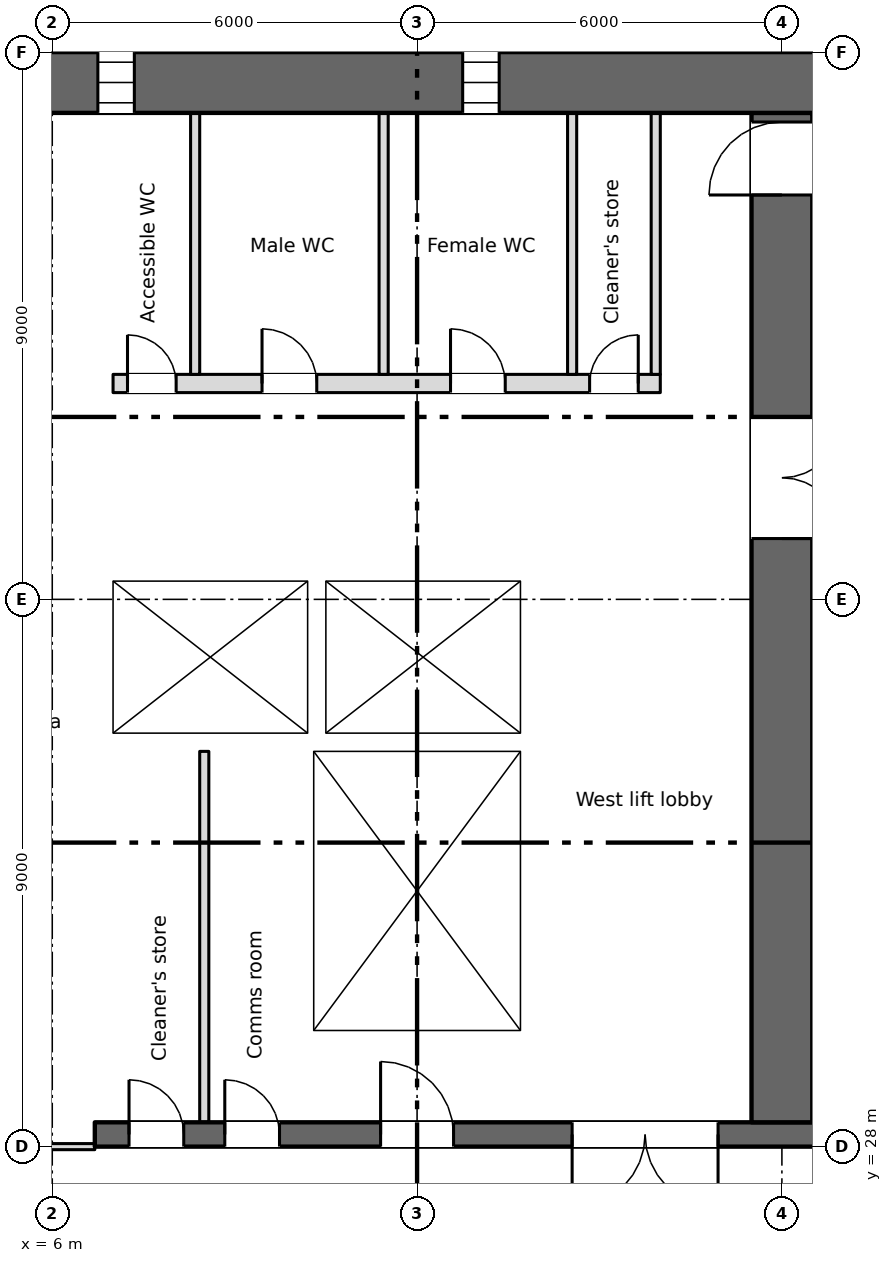
"""IFC4 building model, lengths in metres.
Left out: names, types, materials, properties, quantities, classifications, styles, units other than length and angle.
Written with IfcOpenShell. Run it as: python <this file> out.ifc"""

import sys

from ifc_helpers import new_model, si_unit, direction, frame, frame_2d, origin, place, context, subcontext, project, spatial, rectangle, extrude, element, fill, save


model = new_model("IFC4")
c1 = context("Model", 3, precision=1e-05, world=origin(), true_north=direction((0.0, 1.0)))
c2 = subcontext(c1, "Body", "Model", "MODEL_VIEW")
j1 = project(units=[si_unit("LENGTHUNIT", "METRE"), si_unit("PLANEANGLEUNIT", "RADIAN")], contexts=[c1])
p1 = place(None, origin())
s1 = spatial("IfcSite", under=j1, at=p1, CompositionType="ELEMENT")
p2 = place(p1, origin())
s2 = spatial("IfcBuilding", under=s1, at=p2, CompositionType="ELEMENT")
p3 = place(p2, frame((0.0, 0.0, 26.25)))
s3 = spatial("IfcBuildingStorey", under=s2, at=p3, CompositionType="ELEMENT", Elevation=26.25)
p4 = place(p3, frame((5.55, 45.5, 0.0), z_axis=(0.0, 0.0, 1.0), x_axis=(1.0, 0.0, 0.0)))
e1 = element("IfcWall", 1, at=p4, inside=s3, PredefinedType="SHEAR", context=c2, shape_type="SweptSolid", body=[
    extrude(rectangle(XDim=66.9, YDim=1.0, at=frame_2d((33.45, 0.0))), origin(), (0.0, 0.0, 1.0), 3.35),
])
p5 = place(p4, frame((1.2, 0.0, 0.6)))
e2 = element("IfcOpeningElement", 2, at=p5, cuts=e1, PredefinedType="OPENING", context=c2, shape_type="SweptSolid", body=[
    extrude(rectangle(XDim=0.6, YDim=2.4, at=frame_2d((0.3, 1.2))), frame((0.0, 0.51, 0.0), z_axis=(0.0, -1.0, 0.0), x_axis=(1.0, 0.0, 0.0)), (0.0, 0.0, 1.0), 1.02),
])
p6 = place(p4, frame((7.2, 0.0, 0.6)))
e3 = element("IfcOpeningElement", 3, at=p6, cuts=e1, PredefinedType="OPENING", context=c2, shape_type="SweptSolid", body=[
    extrude(rectangle(XDim=0.6, YDim=2.4, at=frame_2d((0.3, 1.2))), frame((0.0, 0.51, 0.0), z_axis=(0.0, -1.0, 0.0), x_axis=(1.0, 0.0, 0.0)), (0.0, 0.0, 1.0), 1.02),
])
p7 = place(p3, frame((6.7, 28.2, 0.0), z_axis=(0.0, 0.0, 1.0), x_axis=(1.0, 0.0, 0.0)))
e4 = element("IfcWall", 4, at=p7, inside=s3, PredefinedType="SHEAR", context=c2, shape_type="SweptSolid", body=[
    extrude(rectangle(XDim=57.8, YDim=0.4, at=frame_2d((28.9, 0.0))), origin(), (0.0, 0.0, 1.0), 3.35),
])
p8 = place(p7, frame((12.562, 0.0, 0.0)))
e5 = element("IfcOpeningElement", 5, at=p8, cuts=e4, PredefinedType="OPENING", context=c2, shape_type="SweptSolid", body=[
    extrude(rectangle(XDim=0.9, YDim=2.1, at=frame_2d((0.45, 1.05))), frame((0.0, 0.21, 0.0), z_axis=(0.0, -1.0, 0.0), x_axis=(1.0, 0.0, 0.0)), (0.0, 0.0, 1.0), 0.42),
])
p9 = place(p7, frame((15.137, 0.0, 0.0)))
e6 = element("IfcOpeningElement", 6, at=p9, cuts=e4, PredefinedType="OPENING", context=c2, shape_type="SweptSolid", body=[
    extrude(rectangle(XDim=0.9, YDim=2.1, at=frame_2d((0.45, 1.05))), frame((0.0, 0.21, 0.0), z_axis=(0.0, -1.0, 0.0), x_axis=(1.0, 0.0, 0.0)), (0.0, 0.0, 1.0), 0.42),
])
p10 = place(p7, frame((49.85, 0.0, 0.0)))
e7 = element("IfcOpeningElement", 7, at=p10, cuts=e4, PredefinedType="OPENING", context=c2, shape_type="SweptSolid", body=[
    extrude(rectangle(XDim=0.9, YDim=2.1, at=frame_2d((0.45, 1.05))), frame((0.0, 0.21, 0.0), z_axis=(0.0, -1.0, 0.0), x_axis=(1.0, 0.0, 0.0)), (0.0, 0.0, 1.0), 0.42),
])
p11 = place(p7, frame((0.562, 0.0, 0.0)))
e8 = element("IfcOpeningElement", 8, at=p11, cuts=e4, PredefinedType="OPENING", context=c2, shape_type="SweptSolid", body=[
    extrude(rectangle(XDim=0.9, YDim=2.1, at=frame_2d((0.45, 1.05))), frame((0.0, 0.21, 0.0), z_axis=(0.0, -1.0, 0.0), x_axis=(1.0, 0.0, 0.0)), (0.0, 0.0, 1.0), 0.42),
])
p12 = place(p7, frame((2.137, 0.0, 0.0)))
e9 = element("IfcOpeningElement", 9, at=p12, cuts=e4, PredefinedType="OPENING", context=c2, shape_type="SweptSolid", body=[
    extrude(rectangle(XDim=0.9, YDim=2.1, at=frame_2d((0.45, 1.05))), frame((0.0, 0.21, 0.0), z_axis=(0.0, -1.0, 0.0), x_axis=(1.0, 0.0, 0.0)), (0.0, 0.0, 1.0), 0.42),
])
p13 = place(p7, frame((4.7, 0.0, 0.0)))
e10 = element("IfcOpeningElement", 10, at=p13, cuts=e4, PredefinedType="OPENING", context=c2, shape_type="SweptSolid", body=[
    extrude(rectangle(XDim=1.2, YDim=2.1, at=frame_2d((0.6, 1.05))), frame((0.0, 0.21, 0.0), z_axis=(0.0, -1.0, 0.0), x_axis=(1.0, 0.0, 0.0)), (0.0, 0.0, 1.0), 0.42),
])
p14 = place(p7, frame((31.7, 0.0, 0.0)))
e11 = element("IfcOpeningElement", 11, at=p14, cuts=e4, PredefinedType="OPENING", context=c2, shape_type="SweptSolid", body=[
    extrude(rectangle(XDim=1.2, YDim=2.1, at=frame_2d((0.6, 1.05))), frame((0.0, 0.21, 0.0), z_axis=(0.0, -1.0, 0.0), x_axis=(1.0, 0.0, 0.0)), (0.0, 0.0, 1.0), 0.42),
])
p15 = place(p7, frame((55.2, 0.0, 0.0)))
e12 = element("IfcOpeningElement", 12, at=p15, cuts=e4, PredefinedType="OPENING", context=c2, shape_type="SweptSolid", body=[
    extrude(rectangle(XDim=1.2, YDim=2.1, at=frame_2d((0.6, 1.05))), frame((0.0, 0.21, 0.0), z_axis=(0.0, -1.0, 0.0), x_axis=(1.0, 0.0, 0.0)), (0.0, 0.0, 1.0), 0.42),
])
p16 = place(p7, frame((21.7, 0.0, 0.0)))
e13 = element("IfcOpeningElement", 13, at=p16, cuts=e4, PredefinedType="OPENING", context=c2, shape_type="SweptSolid", body=[
    extrude(rectangle(XDim=1.2, YDim=2.1, at=frame_2d((0.6, 1.05))), frame((0.0, 0.21, 0.0), z_axis=(0.0, -1.0, 0.0), x_axis=(1.0, 0.0, 0.0)), (0.0, 0.0, 1.0), 0.42),
])
p17 = place(p7, frame((41.7, 0.0, 0.0)))
e14 = element("IfcOpeningElement", 14, at=p17, cuts=e4, PredefinedType="OPENING", context=c2, shape_type="SweptSolid", body=[
    extrude(rectangle(XDim=1.2, YDim=2.1, at=frame_2d((0.6, 1.05))), frame((0.0, 0.21, 0.0), z_axis=(0.0, -1.0, 0.0), x_axis=(1.0, 0.0, 0.0)), (0.0, 0.0, 1.0), 0.42),
])
p18 = place(p7, frame((24.85, 0.0, 0.0)))
e15 = element("IfcOpeningElement", 15, at=p18, cuts=e4, PredefinedType="OPENING", context=c2, shape_type="SweptSolid", body=[
    extrude(rectangle(XDim=2.4, YDim=2.1, at=frame_2d((1.2, 1.05))), frame((0.0, 0.21, 0.0), z_axis=(0.0, -1.0, 0.0), x_axis=(1.0, 0.0, 0.0)), (0.0, 0.0, 1.0), 0.42),
])
p19 = place(p7, frame((37.35, 0.0, 0.0)))
e16 = element("IfcOpeningElement", 16, at=p19, cuts=e4, PredefinedType="OPENING", context=c2, shape_type="SweptSolid", body=[
    extrude(rectangle(XDim=2.4, YDim=2.1, at=frame_2d((1.2, 1.05))), frame((0.0, 0.21, 0.0), z_axis=(0.0, -1.0, 0.0), x_axis=(1.0, 0.0, 0.0)), (0.0, 0.0, 1.0), 0.42),
])
p20 = place(p7, frame((7.85, 0.0, 0.0)))
e17 = element("IfcOpeningElement", 17, at=p20, cuts=e4, PredefinedType="OPENING", context=c2, shape_type="SweptSolid", body=[
    extrude(rectangle(XDim=2.4, YDim=2.1, at=frame_2d((1.2, 1.05))), frame((0.0, 0.21, 0.0), z_axis=(0.0, -1.0, 0.0), x_axis=(1.0, 0.0, 0.0)), (0.0, 0.0, 1.0), 0.42),
])
p21 = place(p7, frame((28.85, 0.0, 0.0)))
e18 = element("IfcOpeningElement", 18, at=p21, cuts=e4, PredefinedType="OPENING", context=c2, shape_type="SweptSolid", body=[
    extrude(rectangle(XDim=0.9, YDim=2.1, at=frame_2d((0.45, 1.05))), frame((0.0, 0.21, 0.0), z_axis=(0.0, -1.0, 0.0), x_axis=(1.0, 0.0, 0.0)), (0.0, 0.0, 1.0), 0.42),
])
p22 = place(p7, frame((34.85, 0.0, 0.0)))
e19 = element("IfcOpeningElement", 19, at=p22, cuts=e4, PredefinedType="OPENING", context=c2, shape_type="SweptSolid", body=[
    extrude(rectangle(XDim=0.9, YDim=2.1, at=frame_2d((0.45, 1.05))), frame((0.0, 0.21, 0.0), z_axis=(0.0, -1.0, 0.0), x_axis=(1.0, 0.0, 0.0)), (0.0, 0.0, 1.0), 0.42),
])
p23 = place(p3, frame((6.85, 28.4, 0.0), z_axis=(0.0, 0.0, 1.0), x_axis=(0.0, 1.0, 0.0)))
e20 = element("IfcWall", 20, at=p23, inside=s3, PredefinedType="SHEAR", context=c2, shape_type="SweptSolid", body=[
    extrude(rectangle(XDim=16.6, YDim=0.3, at=frame_2d((8.3, 0.0))), origin(), (0.0, 0.0, 1.0), 3.35),
])
p24 = place(p3, frame((18.0, 28.4, 0.0), z_axis=(0.0, 0.0, 1.0), x_axis=(0.0, 1.0, 0.0)))
e21 = element("IfcWall", 21, at=p24, inside=s3, PredefinedType="SHEAR", context=c2, shape_type="SweptSolid", body=[
    extrude(rectangle(XDim=16.6, YDim=1.0, at=frame_2d((8.3, 0.0))), origin(), (0.0, 0.0, 1.0), 3.35),
])
p25 = place(p24, frame((9.6, 0.0, 0.0)))
e22 = element("IfcOpeningElement", 22, at=p25, cuts=e21, PredefinedType="OPENING", context=c2, shape_type="SweptSolid", body=[
    extrude(rectangle(XDim=2.0, YDim=2.1, at=frame_2d((1.0, 1.05))), frame((0.0, 0.51, 0.0), z_axis=(0.0, -1.0, 0.0), x_axis=(1.0, 0.0, 0.0)), (0.0, 0.0, 1.0), 1.02),
])
p26 = place(p24, frame((15.25, 0.0, 0.0)))
e23 = element("IfcOpeningElement", 23, at=p26, cuts=e21, PredefinedType="OPENING", context=c2, shape_type="SweptSolid", body=[
    extrude(rectangle(XDim=1.2, YDim=2.1, at=frame_2d((0.6, 1.05))), frame((0.0, 0.51, 0.0), z_axis=(0.0, -1.0, 0.0), x_axis=(1.0, 0.0, 0.0)), (0.0, 0.0, 1.0), 1.02),
])
for number, where, z_axis, x_axis in (
    (24, (10.15, 28.4, 0.0), (0.0, 0.0, 1.0), (0.0, 1.0, 0.0)),
    (25, (13.85, 28.4, 0.0), (0.0, 0.0, 1.0), (0.0, 1.0, 0.0)),
):
    element("IfcWall", number, at=place(p3, frame(where, z_axis=z_axis, x_axis=x_axis)), inside=s3, PredefinedType="SHEAR", context=c2, shape_type="SweptSolid", body=[
        extrude(rectangle(XDim=6.1, YDim=0.3, at=frame_2d((3.05, 0.0))), origin(), (0.0, 0.0, 1.0), 3.35),
    ])
for number, where, z_axis, x_axis in (
    (26, (7.0, 34.65, 0.0), (0.0, 0.0, 1.0), (1.0, 0.0, 0.0)),
    (27, (7.0, 37.45, 0.0), (0.0, 0.0, 1.0), (1.0, 0.0, 0.0)),
):
    element("IfcWall", number, at=place(p3, frame(where, z_axis=z_axis, x_axis=x_axis)), inside=s3, PredefinedType="SHEAR", context=c2, shape_type="SweptSolid", body=[
        extrude(rectangle(XDim=7.0, YDim=0.3, at=frame_2d((3.5, 0.0))), origin(), (0.0, 0.0, 1.0), 3.35),
    ])
p27 = place(p3, frame((13.85, 34.8, 0.0), z_axis=(0.0, 0.0, 1.0), x_axis=(0.0, 1.0, 0.0)))
e28 = element("IfcWall", 28, at=p27, inside=s3, PredefinedType="SHEAR", context=c2, shape_type="SweptSolid", body=[
    extrude(rectangle(XDim=2.5, YDim=0.3, at=frame_2d((1.25, 0.0))), origin(), (0.0, 0.0, 1.0), 3.35),
])
p28 = place(p3, frame((7.0, 40.55, 0.0), z_axis=(0.0, 0.0, 1.0), x_axis=(1.0, 0.0, 0.0)))
e29 = element("IfcWall", 29, at=p28, inside=s3, PredefinedType="PARTITIONING", context=c2, shape_type="SweptSolid", body=[
    extrude(rectangle(XDim=9.0, YDim=0.3, at=frame_2d((4.5, 0.0))), origin(), (0.0, 0.0, 1.0), 3.35),
])
p29 = place(p28, frame((0.238, 0.0, 0.0)))
e30 = element("IfcOpeningElement", 30, at=p29, cuts=e29, PredefinedType="OPENING", context=c2, shape_type="SweptSolid", body=[
    extrude(rectangle(XDim=0.8, YDim=2.1, at=frame_2d((0.4, 1.05))), frame((0.0, 0.16, 0.0), z_axis=(0.0, -1.0, 0.0), x_axis=(1.0, 0.0, 0.0)), (0.0, 0.0, 1.0), 0.32),
])
p30 = place(p28, frame((2.45, 0.0, 0.0)))
e31 = element("IfcOpeningElement", 31, at=p30, cuts=e29, PredefinedType="OPENING", context=c2, shape_type="SweptSolid", body=[
    extrude(rectangle(XDim=0.9, YDim=2.1, at=frame_2d((0.45, 1.05))), frame((0.0, 0.16, 0.0), z_axis=(0.0, -1.0, 0.0), x_axis=(1.0, 0.0, 0.0)), (0.0, 0.0, 1.0), 0.32),
])
p31 = place(p28, frame((5.55, 0.0, 0.0)))
e32 = element("IfcOpeningElement", 32, at=p31, cuts=e29, PredefinedType="OPENING", context=c2, shape_type="SweptSolid", body=[
    extrude(rectangle(XDim=0.9, YDim=2.1, at=frame_2d((0.45, 1.05))), frame((0.0, 0.16, 0.0), z_axis=(0.0, -1.0, 0.0), x_axis=(1.0, 0.0, 0.0)), (0.0, 0.0, 1.0), 0.32),
])
p32 = place(p28, frame((7.837, 0.0, 0.0)))
e33 = element("IfcOpeningElement", 33, at=p32, cuts=e29, PredefinedType="OPENING", context=c2, shape_type="SweptSolid", body=[
    extrude(rectangle(XDim=0.8, YDim=2.1, at=frame_2d((0.4, 1.05))), frame((0.0, 0.16, 0.0), z_axis=(0.0, -1.0, 0.0), x_axis=(1.0, 0.0, 0.0)), (0.0, 0.0, 1.0), 0.32),
])
p33 = place(p3, frame((10.35, 34.8, 0.0), z_axis=(0.0, 0.0, 1.0), x_axis=(0.0, 1.0, 0.0)))
e34 = element("IfcWall", 34, at=p33, inside=s3, PredefinedType="SHEAR", context=c2, shape_type="SweptSolid", body=[
    extrude(rectangle(XDim=2.5, YDim=0.3, at=frame_2d((1.25, 0.0))), origin(), (0.0, 0.0, 1.0), 3.35),
])
p34 = place(p3, frame((15.925, 40.7, 0.0), z_axis=(0.0, 0.0, 1.0), x_axis=(0.0, 1.0, 0.0)))
e35 = element("IfcWall", 35, at=p34, inside=s3, PredefinedType="PARTITIONING", context=c2, shape_type="SweptSolid", body=[
    extrude(rectangle(XDim=4.3, YDim=0.15, at=frame_2d((2.15, 0.0))), origin(), (0.0, 0.0, 1.0), 3.35),
])
p35 = place(p3, frame((8.5, 28.4, 0.0), z_axis=(0.0, 0.0, 1.0), x_axis=(0.0, 1.0, 0.0)))
e36 = element("IfcWall", 36, at=p35, inside=s3, PredefinedType="PARTITIONING", context=c2, shape_type="SweptSolid", body=[
    extrude(rectangle(XDim=6.1, YDim=0.15, at=frame_2d((3.05, 0.0))), origin(), (0.0, 0.0, 1.0), 3.35),
])
for number, where, z_axis, x_axis in (
    (37, (8.35, 40.7, 0.0), (0.0, 0.0, 1.0), (0.0, 1.0, 0.0)),
    (38, (11.45, 40.7, 0.0), (0.0, 0.0, 1.0), (0.0, 1.0, 0.0)),
    (39, (14.55, 40.7, 0.0), (0.0, 0.0, 1.0), (0.0, 1.0, 0.0)),
):
    element("IfcWall", number, at=place(p3, frame(where, z_axis=z_axis, x_axis=x_axis)), inside=s3, PredefinedType="PARTITIONING", context=c2, shape_type="SweptSolid", body=[
        extrude(rectangle(XDim=4.3, YDim=0.15, at=frame_2d((2.15, 0.0))), origin(), (0.0, 0.0, 1.0), 3.35),
    ])
p36 = place(p3, frame((0.8, 28.0, 0.0), z_axis=(0.0, 0.0, 1.0), x_axis=(1.0, 0.0, 0.0)))
e40 = element("IfcWall", 40, at=p36, inside=s3, PredefinedType="PARTITIONING", context=c2, shape_type="SweptSolid", body=[
    extrude(rectangle(XDim=5.9, YDim=0.1, at=frame_2d((2.95, 0.0))), origin(), (0.0, 0.0, 1.0), 3.35),
])
p37 = place(p36, frame((2.05, 0.0, 0.0)))
e41 = element("IfcOpeningElement", 41, at=p37, cuts=e40, PredefinedType="OPENING", context=c2, shape_type="SweptSolid", body=[
    extrude(rectangle(XDim=1.8, YDim=2.1, at=frame_2d((0.9, 1.05))), frame((0.0, 0.06, 0.0), z_axis=(0.0, -1.0, 0.0), x_axis=(1.0, 0.0, 0.0)), (0.0, 0.0, 1.0), 0.12),
])
p38 = place(p5, origin())
e42 = element("IfcWindow", 42, at=p38, inside=s3, PartitioningType="SINGLE_PANEL", PredefinedType="WINDOW", context=c2, shape_type="SweptSolid", body=[
    extrude(rectangle(XDim=0.6, YDim=2.4, at=frame_2d((0.3, 1.2))), frame((0.0, 0.03, 0.0), z_axis=(0.0, -1.0, 0.0), x_axis=(1.0, 0.0, 0.0)), (0.0, 0.0, 1.0), 0.06),
])
fill(e2, e42)
p39 = place(p6, origin())
e43 = element("IfcWindow", 43, at=p39, inside=s3, PartitioningType="SINGLE_PANEL", PredefinedType="WINDOW", context=c2, shape_type="SweptSolid", body=[
    extrude(rectangle(XDim=0.6, YDim=2.4, at=frame_2d((0.3, 1.2))), frame((0.0, 0.03, 0.0), z_axis=(0.0, -1.0, 0.0), x_axis=(1.0, 0.0, 0.0)), (0.0, 0.0, 1.0), 0.06),
])
fill(e3, e43)
p40 = place(p11, origin())
e44 = element("IfcDoor", 44, at=p40, inside=s3, OperationType="SINGLE_SWING_LEFT", PredefinedType="DOOR", context=c2, shape_type="SweptSolid", body=[
    extrude(rectangle(XDim=0.9, YDim=2.1, at=frame_2d((0.45, 1.05))), frame((0.0, 0.025, 0.0), z_axis=(0.0, -1.0, 0.0), x_axis=(1.0, 0.0, 0.0)), (0.0, 0.0, 1.0), 0.05),
])
fill(e8, e44)
p41 = place(p12, origin())
e45 = element("IfcDoor", 45, at=p41, inside=s3, OperationType="SINGLE_SWING_LEFT", PredefinedType="DOOR", context=c2, shape_type="SweptSolid", body=[
    extrude(rectangle(XDim=0.9, YDim=2.1, at=frame_2d((0.45, 1.05))), frame((0.0, 0.025, 0.0), z_axis=(0.0, -1.0, 0.0), x_axis=(1.0, 0.0, 0.0)), (0.0, 0.0, 1.0), 0.05),
])
fill(e9, e45)
p42 = place(p29, origin())
e46 = element("IfcDoor", 46, at=p42, inside=s3, OperationType="SINGLE_SWING_LEFT", PredefinedType="DOOR", context=c2, shape_type="SweptSolid", body=[
    extrude(rectangle(XDim=0.8, YDim=2.1, at=frame_2d((0.4, 1.05))), frame((0.0, 0.025, 0.0), z_axis=(0.0, -1.0, 0.0), x_axis=(1.0, 0.0, 0.0)), (0.0, 0.0, 1.0), 0.05),
])
fill(e30, e46)
p43 = place(p30, origin())
e47 = element("IfcDoor", 47, at=p43, inside=s3, OperationType="SINGLE_SWING_LEFT", PredefinedType="DOOR", context=c2, shape_type="SweptSolid", body=[
    extrude(rectangle(XDim=0.9, YDim=2.1, at=frame_2d((0.45, 1.05))), frame((0.0, 0.025, 0.0), z_axis=(0.0, -1.0, 0.0), x_axis=(1.0, 0.0, 0.0)), (0.0, 0.0, 1.0), 0.05),
])
fill(e31, e47)
p44 = place(p31, origin())
e48 = element("IfcDoor", 48, at=p44, inside=s3, OperationType="SINGLE_SWING_LEFT", PredefinedType="DOOR", context=c2, shape_type="SweptSolid", body=[
    extrude(rectangle(XDim=0.9, YDim=2.1, at=frame_2d((0.45, 1.05))), frame((0.0, 0.025, 0.0), z_axis=(0.0, -1.0, 0.0), x_axis=(1.0, 0.0, 0.0)), (0.0, 0.0, 1.0), 0.05),
])
fill(e32, e48)
p45 = place(p32, origin())
e49 = element("IfcDoor", 49, at=p45, inside=s3, OperationType="SINGLE_SWING_RIGHT", PredefinedType="DOOR", context=c2, shape_type="SweptSolid", body=[
    extrude(rectangle(XDim=0.8, YDim=2.1, at=frame_2d((0.4, 1.05))), frame((0.0, 0.025, 0.0), z_axis=(0.0, -1.0, 0.0), x_axis=(1.0, 0.0, 0.0)), (0.0, 0.0, 1.0), 0.05),
])
fill(e33, e49)
p46 = place(p13, origin())
e50 = element("IfcDoor", 50, at=p46, inside=s3, OperationType="SINGLE_SWING_LEFT", PredefinedType="DOOR", context=c2, shape_type="SweptSolid", body=[
    extrude(rectangle(XDim=1.2, YDim=2.1, at=frame_2d((0.6, 1.05))), frame((0.0, 0.025, 0.0), z_axis=(0.0, -1.0, 0.0), x_axis=(1.0, 0.0, 0.0)), (0.0, 0.0, 1.0), 0.05),
])
fill(e10, e50)
p47 = place(p20, origin())
e51 = element("IfcDoor", 51, at=p47, inside=s3, OperationType="DOUBLE_DOOR_SINGLE_SWING", PredefinedType="DOOR", context=c2, shape_type="SweptSolid", body=[
    extrude(rectangle(XDim=2.4, YDim=2.1, at=frame_2d((1.2, 1.05))), frame((0.0, 0.025, 0.0), z_axis=(0.0, -1.0, 0.0), x_axis=(1.0, 0.0, 0.0)), (0.0, 0.0, 1.0), 0.05),
])
fill(e17, e51)
p48 = place(p25, origin())
e52 = element("IfcDoor", 52, at=p48, inside=s3, OperationType="DOUBLE_DOOR_SINGLE_SWING", PredefinedType="DOOR", context=c2, shape_type="SweptSolid", body=[
    extrude(rectangle(XDim=2.0, YDim=2.1, at=frame_2d((1.0, 1.05))), frame((0.0, 0.025, 0.0), z_axis=(0.0, -1.0, 0.0), x_axis=(1.0, 0.0, 0.0)), (0.0, 0.0, 1.0), 0.05),
])
fill(e22, e52)
p49 = place(p26, origin())
e53 = element("IfcDoor", 53, at=p49, inside=s3, OperationType="SINGLE_SWING_LEFT", PredefinedType="DOOR", context=c2, shape_type="SweptSolid", body=[
    extrude(rectangle(XDim=1.2, YDim=2.1, at=frame_2d((0.6, 1.05))), frame((0.0, 0.025, 0.0), z_axis=(0.0, -1.0, 0.0), x_axis=(1.0, 0.0, 0.0)), (0.0, 0.0, 1.0), 0.05),
])
fill(e23, e53)
save(model, sys.argv[1])
